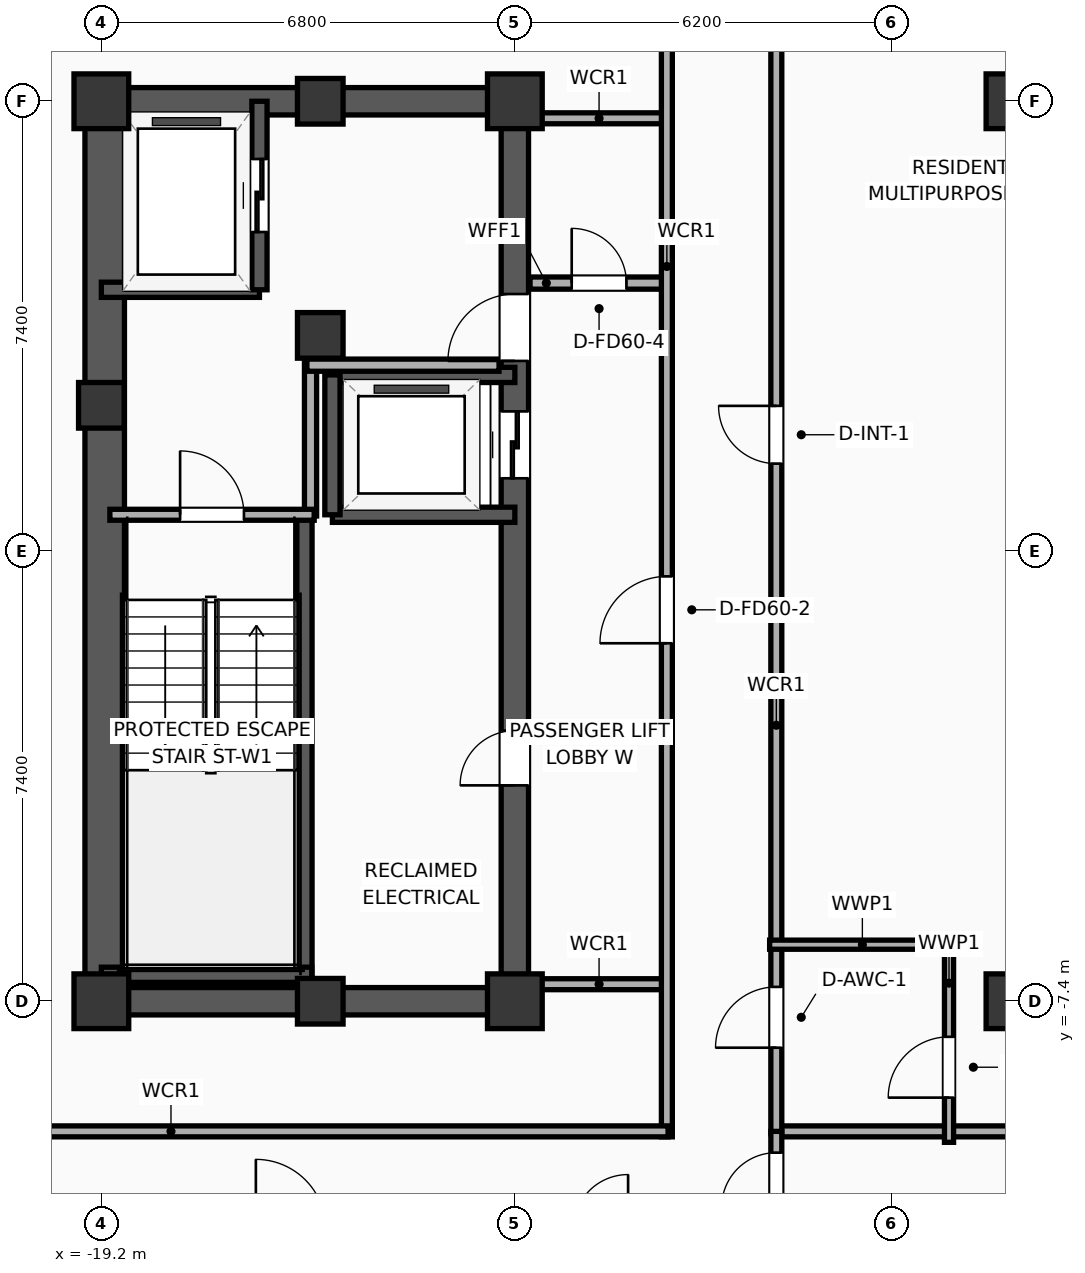
"""IFC4 building model, lengths in metres.
Left out: names, types, materials, properties, quantities, classifications, styles, units other than length and angle.
Written with IfcOpenShell. Run it as: python <this file> out.ifc"""

import sys

from ifc_helpers import new_model, si_unit, direction, frame, frame_2d, origin, origin_2d, place, context, subcontext, project, spatial, rectangle, extrude, element, fill, save


model = new_model("IFC4")
c1 = context("Model", 3, precision=1e-05, world=origin(), true_north=direction((0.0, 1.0)))
c2 = subcontext(c1, "Body", "Model", "MODEL_VIEW")
j1 = project(units=[si_unit("LENGTHUNIT", "METRE"), si_unit("PLANEANGLEUNIT", "RADIAN")], contexts=[c1])
p1 = place(None, origin())
s1 = spatial("IfcSite", under=j1, at=p1, CompositionType="ELEMENT")
p2 = place(p1, origin())
s2 = spatial("IfcBuilding", under=s1, at=p2, CompositionType="ELEMENT")
p3 = place(p2, frame((0.0, 0.0, 231.4)))
s3 = spatial("IfcBuildingStorey", under=s2, at=p3, CompositionType="ELEMENT", Elevation=231.4)
p4 = place(p3, frame((-19.2, -7.4, 0.0), z_axis=(0.0, 0.0, 1.0), x_axis=(1.0, 0.0, 0.0)))
e1 = element("IfcColumn", 1, at=p4, inside=s3, PredefinedType="COLUMN", context=c2, shape_type="SweptSolid", body=[
    extrude(rectangle(XDim=0.9, YDim=0.9, at=origin_2d()), origin(), (0.0, 0.0, 1.0), 3.9),
])
p5 = place(p3, frame((-19.2, 2.4, 0.0), z_axis=(0.0, 0.0, 1.0), x_axis=(1.0, 0.0, 0.0)))
e2 = element("IfcColumn", 2, at=p5, inside=s3, PredefinedType="COLUMN", context=c2, shape_type="SweptSolid", body=[
    extrude(rectangle(XDim=0.75, YDim=0.75, at=origin_2d()), origin(), (0.0, 0.0, 1.0), 3.9),
])
p6 = place(p3, frame((-19.2, 7.4, 0.0), z_axis=(0.0, 0.0, 1.0), x_axis=(1.0, 0.0, 0.0)))
e3 = element("IfcColumn", 3, at=p6, inside=s3, PredefinedType="COLUMN", context=c2, shape_type="SweptSolid", body=[
    extrude(rectangle(XDim=0.9, YDim=0.9, at=origin_2d()), origin(), (0.0, 0.0, 1.0), 3.9),
])
for number, where, z_axis, x_axis in (
    (4, (-15.6, -7.4, 0.0), (0.0, 0.0, 1.0), (1.0, 0.0, 0.0)),
    (5, (-15.6, 7.4, 0.0), (0.0, 0.0, 1.0), (1.0, 0.0, 0.0)),
):
    element("IfcColumn", number, at=place(p3, frame(where, z_axis=z_axis, x_axis=x_axis)), inside=s3, PredefinedType="COLUMN", context=c2, shape_type="SweptSolid", body=[
        extrude(rectangle(XDim=0.75, YDim=0.75, at=origin_2d()), origin(), (0.0, 0.0, 1.0), 3.9),
    ])
p7 = place(p3, frame((-12.4, -7.4, 0.0), z_axis=(0.0, 0.0, 1.0), x_axis=(1.0, 0.0, 0.0)))
e6 = element("IfcColumn", 6, at=p7, inside=s3, PredefinedType="COLUMN", context=c2, shape_type="SweptSolid", body=[
    extrude(rectangle(XDim=0.9, YDim=0.9, at=origin_2d()), origin(), (0.0, 0.0, 1.0), 3.9),
])
p8 = place(p3, frame((-15.6, 3.55, 0.0), z_axis=(0.0, 0.0, 1.0), x_axis=(1.0, 0.0, 0.0)))
e7 = element("IfcColumn", 7, at=p8, inside=s3, PredefinedType="COLUMN", context=c2, shape_type="SweptSolid", body=[
    extrude(rectangle(XDim=0.75, YDim=0.75, at=origin_2d()), origin(), (0.0, 0.0, 1.0), 3.9),
])
p9 = place(p3, frame((-12.4, 7.4, 0.0), z_axis=(0.0, 0.0, 1.0), x_axis=(1.0, 0.0, 0.0)))
e8 = element("IfcColumn", 8, at=p9, inside=s3, PredefinedType="COLUMN", context=c2, shape_type="SweptSolid", body=[
    extrude(rectangle(XDim=0.9, YDim=0.9, at=origin_2d()), origin(), (0.0, 0.0, 1.0), 3.9),
])
for number, where, z_axis, x_axis in (
    (9, (-19.425, -7.4, 0.0), (0.0, 0.0, 1.0), (1.0, 0.0, 0.0)),
    (10, (-19.425, 7.4, 0.0), (0.0, 0.0, 1.0), (1.0, 0.0, 0.0)),
):
    element("IfcWall", number, at=place(p3, frame(where, z_axis=z_axis, x_axis=x_axis)), inside=s3, PredefinedType="SHEAR", context=c2, shape_type="SweptSolid", body=[
        extrude(rectangle(XDim=7.25, YDim=0.45, at=frame_2d((3.625, 0.0))), origin(), (0.0, 0.0, 1.0), 3.65),
    ])
p10 = place(p3, frame((-19.145, -7.4, 0.0), z_axis=(0.0, 0.0, 1.0), x_axis=(0.0, 1.0, 0.0)))
e11 = element("IfcWall", 11, at=p10, inside=s3, PredefinedType="SHEAR", context=c2, shape_type="SweptSolid", body=[
    extrude(rectangle(XDim=14.8, YDim=0.65, at=frame_2d((7.4, 0.0))), origin(), (0.0, 0.0, 1.0), 3.65),
])
p11 = place(p3, frame((-12.4, -7.4, 0.0), z_axis=(0.0, 0.0, 1.0), x_axis=(0.0, 1.0, 0.0)))
e12 = element("IfcWall", 12, at=p11, inside=s3, PredefinedType="SHEAR", context=c2, shape_type="SweptSolid", body=[
    extrude(rectangle(XDim=14.8, YDim=0.45, at=frame_2d((7.4, 0.0))), origin(), (0.0, 0.0, 1.0), 3.65),
])
p12 = place(p11, frame((8.6, 0.0, 0.0)))
e13 = element("IfcOpeningElement", 13, at=p12, cuts=e12, PredefinedType="OPENING", context=c2, shape_type="SweptSolid", body=[
    extrude(rectangle(XDim=1.1, YDim=2.05, at=frame_2d((0.55, 1.025))), frame((0.0, 0.235, 0.0), z_axis=(0.0, -1.0, 0.0), x_axis=(1.0, 0.0, 0.0)), (0.0, 0.0, 1.0), 0.47),
])
p13 = place(p11, frame((10.53, 0.0, 0.0)))
e14 = element("IfcOpeningElement", 14, at=p13, cuts=e12, PredefinedType="OPENING", context=c2, shape_type="SweptSolid", body=[
    extrude(rectangle(XDim=1.1, YDim=2.05, at=frame_2d((0.55, 1.025))), frame((0.0, 0.235, 0.0), z_axis=(0.0, -1.0, 0.0), x_axis=(1.0, 0.0, 0.0)), (0.0, 0.0, 1.0), 0.47),
])
p14 = place(p11, frame((3.55, 0.0, 0.0)))
e15 = element("IfcOpeningElement", 15, at=p14, cuts=e12, PredefinedType="OPENING", context=c2, shape_type="SweptSolid", body=[
    extrude(rectangle(XDim=0.9, YDim=2.05, at=frame_2d((0.45, 1.025))), frame((0.0, 0.235, 0.0), z_axis=(0.0, -1.0, 0.0), x_axis=(1.0, 0.0, 0.0)), (0.0, 0.0, 1.0), 0.47),
])
p15 = place(p3, frame((-15.86, -7.085, 0.0), z_axis=(0.0, 0.0, 1.0), x_axis=(0.0, 1.0, 0.0)))
e16 = element("IfcWall", 16, at=p15, inside=s3, PredefinedType="SOLIDWALL", context=c2, shape_type="SweptSolid", body=[
    extrude(rectangle(XDim=7.685, YDim=0.25, at=frame_2d((3.843, 0.0))), origin(), (0.0, 0.0, 1.0), 3.65),
])
p16 = place(p3, frame((-19.2, -6.965, 0.0), z_axis=(0.0, 0.0, 1.0), x_axis=(1.0, 0.0, 0.0)))
e17 = element("IfcWall", 17, at=p16, inside=s3, PredefinedType="SOLIDWALL", context=c2, shape_type="SweptSolid", body=[
    extrude(rectangle(XDim=3.46, YDim=0.25, at=frame_2d((1.73, 0.0))), origin(), (0.0, 0.0, 1.0), 3.65),
])
for number, where, z_axis, x_axis in (
    (18, (-4.2, -7.4, 0.0), (0.0, 0.0, 1.0), (1.0, 0.0, 0.0)),
    (19, (-4.2, 7.4, 0.0), (0.0, 0.0, 1.0), (1.0, 0.0, 0.0)),
):
    element("IfcColumn", number, at=place(p3, frame(where, z_axis=z_axis, x_axis=x_axis)), inside=s3, PredefinedType="COLUMN", context=c2, shape_type="SweptSolid", body=[
        extrude(rectangle(XDim=0.9, YDim=0.9, at=origin_2d()), origin(), (0.0, 0.0, 1.0), 3.9),
    ])
p17 = place(p3, frame((-19.2, 4.3, 0.0), z_axis=(0.0, 0.0, 1.0), x_axis=(1.0, 0.0, 0.0)))
e20 = element("IfcWall", 20, at=p17, inside=s3, PredefinedType="SOLIDWALL", context=c2, shape_type="SweptSolid", body=[
    extrude(rectangle(XDim=2.6, YDim=0.25, at=frame_2d((1.3, 0.0))), origin(), (0.0, 0.0, 1.0), 3.65),
])
p18 = place(p3, frame((-16.6, 4.3, 0.0), z_axis=(0.0, 0.0, 1.0), x_axis=(0.0, 1.0, 0.0)))
e21 = element("IfcWall", 21, at=p18, inside=s3, PredefinedType="SOLIDWALL", context=c2, shape_type="SweptSolid", body=[
    extrude(rectangle(XDim=3.1, YDim=0.25, at=frame_2d((1.55, 0.0))), origin(), (0.0, 0.0, 1.0), 3.65),
])
p19 = place(p18, frame((0.95, 0.0, 0.0)))
e22 = element("IfcOpeningElement", 22, at=p19, cuts=e21, PredefinedType="OPENING", context=c2, shape_type="SweptSolid", body=[
    extrude(rectangle(XDim=1.2, YDim=2.05, at=frame_2d((0.6, 1.025))), frame((0.0, 0.135, 0.0), z_axis=(0.0, -1.0, 0.0), x_axis=(1.0, 0.0, 0.0)), (0.0, 0.0, 1.0), 0.27),
])
for number, where, z_axis, x_axis in (
    (23, (-15.4, 0.6, 0.0), (0.0, 0.0, 1.0), (1.0, 0.0, 0.0)),
    (24, (-12.4, 2.9, 0.0), (0.0, 0.0, 1.0), (-1.0, 0.0, 0.0)),
):
    element("IfcWall", number, at=place(p3, frame(where, z_axis=z_axis, x_axis=x_axis)), inside=s3, PredefinedType="SOLIDWALL", context=c2, shape_type="SweptSolid", body=[
        extrude(rectangle(XDim=3.0, YDim=0.25, at=frame_2d((1.5, 0.0))), origin(), (0.0, 0.0, 1.0), 3.65),
    ])
p20 = place(p3, frame((-15.4, 2.9, 0.0), z_axis=(0.0, 0.0, 1.0), x_axis=(0.0, -1.0, 0.0)))
e25 = element("IfcWall", 25, at=p20, inside=s3, PredefinedType="SOLIDWALL", context=c2, shape_type="SweptSolid", body=[
    extrude(rectangle(XDim=2.3, YDim=0.25, at=frame_2d((1.15, 0.0))), origin(), (0.0, 0.0, 1.0), 3.65),
])
p21 = place(p3, frame((-15.76, 0.58, 0.0), z_axis=(0.0, 0.0, 1.0), x_axis=(0.0, 1.0, 0.0)))
e26 = element("IfcWall", 26, at=p21, inside=s3, PredefinedType="PARTITIONING", context=c2, shape_type="SweptSolid", body=[
    extrude(rectangle(XDim=2.52, YDim=0.2, at=frame_2d((1.26, 0.0))), origin(), (0.0, 0.0, 1.0), 3.65),
])
p22 = place(p3, frame((-15.82, 3.06, 0.0), z_axis=(0.0, 0.0, 1.0), x_axis=(1.0, 0.0, 0.0)))
e27 = element("IfcWall", 27, at=p22, inside=s3, PredefinedType="PARTITIONING", context=c2, shape_type="SweptSolid", body=[
    extrude(rectangle(XDim=3.16, YDim=0.2, at=frame_2d((1.58, 0.0))), origin(), (0.0, 0.0, 1.0), 3.65),
])
p23 = place(p3, frame((-19.06, 0.6, 0.0), z_axis=(0.0, 0.0, 1.0), x_axis=(1.0, 0.0, 0.0)))
e28 = element("IfcWall", 28, at=p23, inside=s3, PredefinedType="PARTITIONING", context=c2, shape_type="SweptSolid", body=[
    extrude(rectangle(XDim=3.36, YDim=0.18, at=frame_2d((1.68, 0.0))), origin(), (0.0, 0.0, 1.0), 3.65),
])
p24 = place(p23, frame((1.155, 0.0, 0.0)))
e29 = element("IfcOpeningElement", 29, at=p24, cuts=e28, PredefinedType="OPENING", context=c2, shape_type="SweptSolid", body=[
    extrude(rectangle(XDim=1.05, YDim=2.05, at=frame_2d((0.525, 1.025))), frame((0.0, 0.1, 0.0), z_axis=(0.0, -1.0, 0.0), x_axis=(1.0, 0.0, 0.0)), (0.0, 0.0, 1.0), 0.2),
])
p25 = place(p3, frame((-12.15, 4.41, 0.0), z_axis=(0.0, 0.0, 1.0), x_axis=(1.0, 0.0, 0.0)))
e30 = element("IfcWall", 30, at=p25, inside=s3, PredefinedType="PARTITIONING", context=c2, shape_type="SweptSolid", body=[
    extrude(rectangle(XDim=2.27, YDim=0.2, at=frame_2d((1.135, 0.0))), origin(), (0.0, 0.0, 1.0), 3.65),
])
p26 = place(p25, frame((0.685, 0.0, 0.0)))
e31 = element("IfcOpeningElement", 31, at=p26, cuts=e30, PredefinedType="OPENING", context=c2, shape_type="SweptSolid", body=[
    extrude(rectangle(XDim=0.9, YDim=2.05, at=frame_2d((0.45, 1.025))), frame((0.0, 0.11, 0.0), z_axis=(0.0, -1.0, 0.0), x_axis=(1.0, 0.0, 0.0)), (0.0, 0.0, 1.0), 0.22),
])
for number, where, z_axis, x_axis in (
    (32, (-12.15, 7.12, 0.0), (0.0, 0.0, 1.0), (1.0, 0.0, 0.0)),
    (33, (-12.15, -7.12, 0.0), (0.0, 0.0, 1.0), (1.0, 0.0, 0.0)),
):
    element("IfcWall", number, at=place(p3, frame(where, z_axis=z_axis, x_axis=x_axis)), inside=s3, PredefinedType="PARTITIONING", context=c2, shape_type="SweptSolid", body=[
        extrude(rectangle(XDim=2.27, YDim=0.18, at=frame_2d((1.135, 0.0))), origin(), (0.0, 0.0, 1.0), 3.65),
    ])
p27 = place(p3, frame((-9.9, -9.63, 0.0), z_axis=(0.0, 0.0, 1.0), x_axis=(0.0, 1.0, 0.0)))
e34 = element("IfcWall", 34, at=p27, inside=s3, PredefinedType="PARTITIONING", context=c2, shape_type="SweptSolid", body=[
    extrude(rectangle(XDim=19.26, YDim=0.18, at=frame_2d((9.63, 0.0))), origin(), (0.0, 0.0, 1.0), 3.65),
])
p28 = place(p27, frame((8.117, 0.0, 0.0)))
e35 = element("IfcOpeningElement", 35, at=p28, cuts=e34, PredefinedType="OPENING", context=c2, shape_type="SweptSolid", body=[
    extrude(rectangle(XDim=1.1, YDim=2.05, at=frame_2d((0.55, 1.025))), frame((0.0, 0.1, 0.0), z_axis=(0.0, -1.0, 0.0), x_axis=(1.0, 0.0, 0.0)), (0.0, 0.0, 1.0), 0.2),
])
p29 = place(p3, frame((-26.23, -9.54, 0.0), z_axis=(0.0, 0.0, 1.0), x_axis=(1.0, 0.0, 0.0)))
e36 = element("IfcWall", 36, at=p29, inside=s3, PredefinedType="PARTITIONING", context=c2, shape_type="SweptSolid", body=[
    extrude(rectangle(XDim=16.35, YDim=0.18, at=frame_2d((8.175, 0.0))), origin(), (0.0, 0.0, 1.0), 3.65),
])
p30 = place(p3, frame((-8.15, -9.54, 0.0), z_axis=(0.0, 0.0, 1.0), x_axis=(1.0, 0.0, 0.0)))
e37 = element("IfcWall", 37, at=p30, inside=s3, PredefinedType="PARTITIONING", context=c2, shape_type="SweptSolid", body=[
    extrude(rectangle(XDim=16.3, YDim=0.18, at=frame_2d((8.15, 0.0))), origin(), (0.0, 0.0, 1.0), 3.65),
])
p31 = place(p3, frame((-8.1, -9.58, 0.0), z_axis=(0.0, 0.0, 1.0), x_axis=(0.0, 1.0, 0.0)))
e38 = element("IfcWall", 38, at=p31, inside=s3, PredefinedType="PARTITIONING", context=c2, shape_type="SweptSolid", body=[
    extrude(rectangle(XDim=19.16, YDim=0.18, at=frame_2d((9.58, 0.0))), origin(), (0.0, 0.0, 1.0), 3.65),
])
p32 = place(p31, frame((1.416, 0.0, 0.0)))
e39 = element("IfcOpeningElement", 39, at=p32, cuts=e38, PredefinedType="OPENING", context=c2, shape_type="SweptSolid", body=[
    extrude(rectangle(XDim=1.0, YDim=2.05, at=frame_2d((0.5, 1.025))), frame((0.0, 0.1, 0.0), z_axis=(0.0, -1.0, 0.0), x_axis=(1.0, 0.0, 0.0)), (0.0, 0.0, 1.0), 0.2),
])
p33 = place(p31, frame((11.021, 0.0, 0.0)))
e40 = element("IfcOpeningElement", 40, at=p33, cuts=e38, PredefinedType="OPENING", context=c2, shape_type="SweptSolid", body=[
    extrude(rectangle(XDim=0.95, YDim=2.05, at=frame_2d((0.475, 1.025))), frame((0.0, 0.1, 0.0), z_axis=(0.0, -1.0, 0.0), x_axis=(1.0, 0.0, 0.0)), (0.0, 0.0, 1.0), 0.2),
])
p34 = place(p3, frame((-5.26, -9.72, 0.0), z_axis=(0.0, 0.0, 1.0), x_axis=(0.0, 1.0, 0.0)))
e41 = element("IfcWall", 41, at=p34, inside=s3, PredefinedType="PLUMBINGWALL", context=c2, shape_type="SweptSolid", body=[
    extrude(rectangle(XDim=3.35, YDim=0.15, at=frame_2d((1.675, 0.0))), origin(), (0.0, 0.0, 1.0), 3.65),
])
p35 = place(p34, frame((0.735, 0.0, 0.0)))
e42 = element("IfcOpeningElement", 42, at=p35, cuts=e41, PredefinedType="OPENING", context=c2, shape_type="SweptSolid", body=[
    extrude(rectangle(XDim=1.0, YDim=2.05, at=frame_2d((0.5, 1.025))), frame((0.0, 0.085, 0.0), z_axis=(0.0, -1.0, 0.0), x_axis=(1.0, 0.0, 0.0)), (0.0, 0.0, 1.0), 0.17),
])
p36 = place(p3, frame((-8.21, -6.47, 0.0), z_axis=(0.0, 0.0, 1.0), x_axis=(1.0, 0.0, 0.0)))
e43 = element("IfcWall", 43, at=p36, inside=s3, PredefinedType="PLUMBINGWALL", context=c2, shape_type="SweptSolid", body=[
    extrude(rectangle(XDim=3.05, YDim=0.15, at=frame_2d((1.525, 0.0))), origin(), (0.0, 0.0, 1.0), 3.65),
])
p37 = place(p3, frame((-8.1, -18.83, 0.0), z_axis=(0.0, 0.0, 1.0), x_axis=(0.0, 1.0, 0.0)))
e44 = element("IfcWall", 44, at=p37, inside=s3, PredefinedType="PARTITIONING", context=c2, shape_type="SweptSolid", body=[
    extrude(rectangle(XDim=9.29, YDim=0.18, at=frame_2d((4.645, 0.0))), origin(), (0.0, 0.0, 1.0), 3.65),
])
p38 = place(p37, frame((8.04, 0.0, 0.0)))
e45 = element("IfcOpeningElement", 45, at=p38, cuts=e44, PredefinedType="OPENING", context=c2, shape_type="SweptSolid", body=[
    extrude(rectangle(XDim=0.9, YDim=2.05, at=frame_2d((0.45, 1.025))), frame((0.0, 0.1, 0.0), z_axis=(0.0, -1.0, 0.0), x_axis=(1.0, 0.0, 0.0)), (0.0, 0.0, 1.0), 0.2),
])
p39 = place(p19, origin())
e46 = element("IfcDoor", 46, at=p39, inside=s3, OperationType="SLIDING_TO_LEFT", PredefinedType="DOOR", context=c2, shape_type="SweptSolid", body=[
    extrude(rectangle(XDim=1.2, YDim=2.05, at=frame_2d((0.6, 1.025))), frame((0.0, 0.025, 0.0), z_axis=(0.0, -1.0, 0.0), x_axis=(1.0, 0.0, 0.0)), (0.0, 0.0, 1.0), 0.05),
])
fill(e22, e46)
p40 = place(p12, origin())
e47 = element("IfcDoor", 47, at=p40, inside=s3, OperationType="SLIDING_TO_LEFT", PredefinedType="DOOR", context=c2, shape_type="SweptSolid", body=[
    extrude(rectangle(XDim=1.1, YDim=2.05, at=frame_2d((0.55, 1.025))), frame((0.0, 0.025, 0.0), z_axis=(0.0, -1.0, 0.0), x_axis=(1.0, 0.0, 0.0)), (0.0, 0.0, 1.0), 0.05),
])
fill(e13, e47)
p41 = place(p24, origin())
e48 = element("IfcDoor", 48, at=p41, inside=s3, OperationType="SINGLE_SWING_LEFT", PredefinedType="DOOR", context=c2, shape_type="SweptSolid", body=[
    extrude(rectangle(XDim=1.05, YDim=2.05, at=frame_2d((0.525, 1.025))), frame((0.0, 0.025, 0.0), z_axis=(0.0, -1.0, 0.0), x_axis=(1.0, 0.0, 0.0)), (0.0, 0.0, 1.0), 0.05),
])
fill(e29, e48)
p42 = place(p26, origin())
e49 = element("IfcDoor", 49, at=p42, inside=s3, OperationType="SINGLE_SWING_LEFT", PredefinedType="DOOR", context=c2, shape_type="SweptSolid", body=[
    extrude(rectangle(XDim=0.9, YDim=2.05, at=frame_2d((0.45, 1.025))), frame((0.0, 0.025, 0.0), z_axis=(0.0, -1.0, 0.0), x_axis=(1.0, 0.0, 0.0)), (0.0, 0.0, 1.0), 0.05),
])
fill(e31, e49)
p43 = place(p28, origin())
e50 = element("IfcDoor", 50, at=p43, inside=s3, OperationType="SINGLE_SWING_LEFT", PredefinedType="DOOR", context=c2, shape_type="SweptSolid", body=[
    extrude(rectangle(XDim=1.1, YDim=2.05, at=frame_2d((0.55, 1.025))), frame((0.0, 0.025, 0.0), z_axis=(0.0, -1.0, 0.0), x_axis=(1.0, 0.0, 0.0)), (0.0, 0.0, 1.0), 0.05),
])
fill(e35, e50)
p44 = place(p32, origin())
e51 = element("IfcDoor", 51, at=p44, inside=s3, OperationType="SINGLE_SWING_LEFT", PredefinedType="DOOR", context=c2, shape_type="SweptSolid", body=[
    extrude(rectangle(XDim=1.0, YDim=2.05, at=frame_2d((0.5, 1.025))), frame((0.0, 0.025, 0.0), z_axis=(0.0, -1.0, 0.0), x_axis=(1.0, 0.0, 0.0)), (0.0, 0.0, 1.0), 0.05),
])
fill(e39, e51)
p45 = place(p33, origin())
e52 = element("IfcDoor", 52, at=p45, inside=s3, OperationType="SINGLE_SWING_RIGHT", PredefinedType="DOOR", context=c2, shape_type="SweptSolid", body=[
    extrude(rectangle(XDim=0.95, YDim=2.05, at=frame_2d((0.475, 1.025))), frame((0.0, 0.025, 0.0), z_axis=(0.0, -1.0, 0.0), x_axis=(1.0, 0.0, 0.0)), (0.0, 0.0, 1.0), 0.05),
])
fill(e40, e52)
p46 = place(p35, origin())
e53 = element("IfcDoor", 53, at=p46, inside=s3, OperationType="SINGLE_SWING_LEFT", PredefinedType="DOOR", context=c2, shape_type="SweptSolid", body=[
    extrude(rectangle(XDim=1.0, YDim=2.05, at=frame_2d((0.5, 1.025))), frame((0.0, 0.025, 0.0), z_axis=(0.0, -1.0, 0.0), x_axis=(1.0, 0.0, 0.0)), (0.0, 0.0, 1.0), 0.05),
])
fill(e42, e53)
p47 = place(p38, origin())
e54 = element("IfcDoor", 54, at=p47, inside=s3, OperationType="SINGLE_SWING_LEFT", PredefinedType="DOOR", context=c2, shape_type="SweptSolid", body=[
    extrude(rectangle(XDim=0.9, YDim=2.05, at=frame_2d((0.45, 1.025))), frame((0.0, 0.025, 0.0), z_axis=(0.0, -1.0, 0.0), x_axis=(1.0, 0.0, 0.0)), (0.0, 0.0, 1.0), 0.05),
])
fill(e45, e54)
p48 = place(p13, origin())
e55 = element("IfcDoor", 55, at=p48, inside=s3, OperationType="SINGLE_SWING_LEFT", PredefinedType="DOOR", context=c2, shape_type="SweptSolid", body=[
    extrude(rectangle(XDim=1.1, YDim=2.05, at=frame_2d((0.55, 1.025))), frame((0.0, 0.025, 0.0), z_axis=(0.0, -1.0, 0.0), x_axis=(1.0, 0.0, 0.0)), (0.0, 0.0, 1.0), 0.05),
])
fill(e14, e55)
p49 = place(p14, origin())
e56 = element("IfcDoor", 56, at=p49, inside=s3, OperationType="SINGLE_SWING_LEFT", PredefinedType="DOOR", context=c2, shape_type="SweptSolid", body=[
    extrude(rectangle(XDim=0.9, YDim=2.05, at=frame_2d((0.45, 1.025))), frame((0.0, 0.025, 0.0), z_axis=(0.0, -1.0, 0.0), x_axis=(1.0, 0.0, 0.0)), (0.0, 0.0, 1.0), 0.05),
])
fill(e15, e56)
save(model, sys.argv[1])
